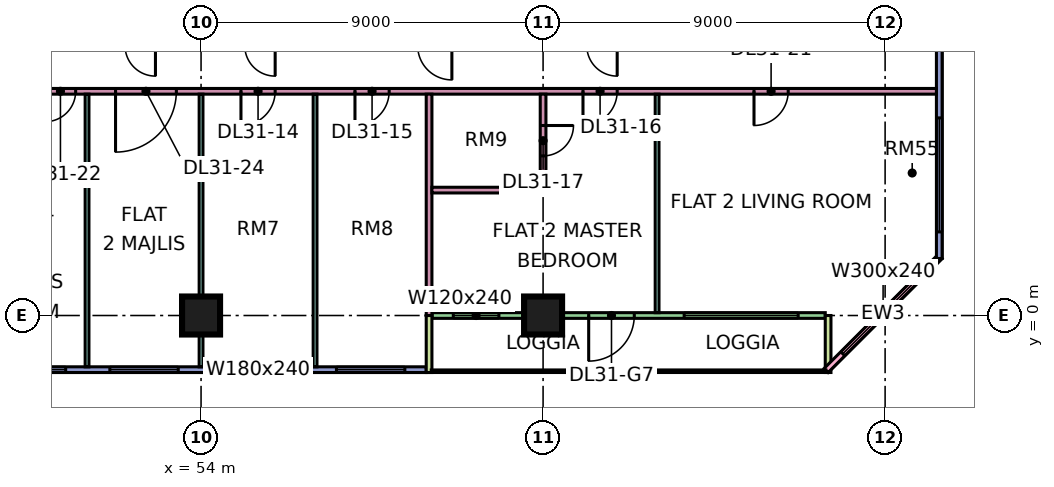
"""IFC4 building model, lengths in metres.
Left out: names, types, materials, properties, quantities, classifications, styles, units other than length and angle.
Written with IfcOpenShell. Run it as: python <this file> out.ifc"""

import sys

from ifc_helpers import new_model, si_unit, direction, frame, frame_2d, origin, origin_2d, place, context, subcontext, project, spatial, rectangle, extrude, element, fill, save


model = new_model("IFC4")
c1 = context("Model", 3, precision=1e-05, world=origin(), true_north=direction((0.0, 1.0)))
c2 = subcontext(c1, "Body", "Model", "MODEL_VIEW")
j1 = project(units=[si_unit("LENGTHUNIT", "METRE"), si_unit("PLANEANGLEUNIT", "RADIAN")], contexts=[c1])
p1 = place(None, origin())
s1 = spatial("IfcSite", under=j1, at=p1, CompositionType="ELEMENT")
p2 = place(p1, origin())
s2 = spatial("IfcBuilding", under=s1, at=p2, CompositionType="ELEMENT")
p3 = place(p2, frame((0.0, 0.0, 133.15)))
s3 = spatial("IfcBuildingStorey", under=s2, at=p3, CompositionType="ELEMENT", Elevation=133.15)
for number, where, z_axis, x_axis in (
    (1, (54.0, 0.0, 0.0), (0.0, 0.0, 1.0), (1.0, 0.0, 0.0)),
    (2, (63.0, 0.0, 0.0), (0.0, 0.0, 1.0), (1.0, 0.0, 0.0)),
):
    element("IfcColumn", number, at=place(p3, frame(where, z_axis=z_axis, x_axis=x_axis)), inside=s3, PredefinedType="COLUMN", context=c2, shape_type="SweptSolid", body=[
        extrude(rectangle(XDim=1.0, YDim=1.0, at=origin_2d()), origin(), (0.0, 0.0, 1.0), 3.75),
    ])
p4 = place(p3, frame((48.075, -1.425, 0.0), z_axis=(0.0, 0.0, 1.0), x_axis=(1.0, 0.0, 0.0)))
e3 = element("IfcWall", 3, at=p4, inside=s3, PredefinedType="SOLIDWALL", context=c2, shape_type="SweptSolid", body=[
    extrude(rectangle(XDim=11.85, YDim=0.15, at=frame_2d((5.925, 0.0))), origin(), (0.0, 0.0, 1.0), 3.35),
])
p5 = place(p4, frame((0.562, 0.0, 0.45)))
e4 = element("IfcOpeningElement", 4, at=p5, cuts=e3, PredefinedType="OPENING", context=c2, shape_type="SweptSolid", body=[
    extrude(rectangle(XDim=1.8, YDim=2.4, at=frame_2d((0.9, 1.2))), frame((0.0, 0.085, 0.0), z_axis=(0.0, -1.0, 0.0), x_axis=(1.0, 0.0, 0.0)), (0.0, 0.0, 1.0), 0.17),
])
p6 = place(p4, frame((3.525, 0.0, 0.45)))
e5 = element("IfcOpeningElement", 5, at=p6, cuts=e3, PredefinedType="OPENING", context=c2, shape_type="SweptSolid", body=[
    extrude(rectangle(XDim=1.8, YDim=2.4, at=frame_2d((0.9, 1.2))), frame((0.0, 0.085, 0.0), z_axis=(0.0, -1.0, 0.0), x_axis=(1.0, 0.0, 0.0)), (0.0, 0.0, 1.0), 0.17),
])
p7 = place(p4, frame((6.525, 0.0, 0.45)))
e6 = element("IfcOpeningElement", 6, at=p7, cuts=e3, PredefinedType="OPENING", context=c2, shape_type="SweptSolid", body=[
    extrude(rectangle(XDim=1.8, YDim=2.4, at=frame_2d((0.9, 1.2))), frame((0.0, 0.085, 0.0), z_axis=(0.0, -1.0, 0.0), x_axis=(1.0, 0.0, 0.0)), (0.0, 0.0, 1.0), 0.17),
])
p8 = place(p4, frame((9.488, 0.0, 0.45)))
e7 = element("IfcOpeningElement", 7, at=p8, cuts=e3, PredefinedType="OPENING", context=c2, shape_type="SweptSolid", body=[
    extrude(rectangle(XDim=1.8, YDim=2.4, at=frame_2d((0.9, 1.2))), frame((0.0, 0.085, 0.0), z_axis=(0.0, -1.0, 0.0), x_axis=(1.0, 0.0, 0.0)), (0.0, 0.0, 1.0), 0.17),
])
p9 = place(p3, frame((60.075, 0.0, 0.0), z_axis=(0.0, 0.0, 1.0), x_axis=(1.0, 0.0, 0.0)))
e8 = element("IfcWall", 8, at=p9, inside=s3, PredefinedType="SOLIDWALL", context=c2, shape_type="SweptSolid", body=[
    extrude(rectangle(XDim=10.35, YDim=0.15, at=frame_2d((5.175, 0.0))), origin(), (0.0, 0.0, 1.0), 3.35),
])
p10 = place(p9, frame((0.562, 0.0, 0.45)))
e9 = element("IfcOpeningElement", 9, at=p10, cuts=e8, PredefinedType="OPENING", context=c2, shape_type="SweptSolid", body=[
    extrude(rectangle(XDim=1.2, YDim=2.4, at=frame_2d((0.6, 1.2))), frame((0.0, 0.085, 0.0), z_axis=(0.0, -1.0, 0.0), x_axis=(1.0, 0.0, 0.0)), (0.0, 0.0, 1.0), 0.17),
])
p11 = place(p9, frame((4.125, 0.0, 0.0)))
e10 = element("IfcOpeningElement", 10, at=p11, cuts=e8, PredefinedType="OPENING", context=c2, shape_type="SweptSolid", body=[
    extrude(rectangle(XDim=1.2, YDim=2.4, at=frame_2d((0.6, 1.2))), frame((0.0, 0.085, 0.0), z_axis=(0.0, -1.0, 0.0), x_axis=(1.0, 0.0, 0.0)), (0.0, 0.0, 1.0), 0.17),
])
p12 = place(p9, frame((6.637, 0.0, 0.45)))
e11 = element("IfcOpeningElement", 11, at=p12, cuts=e8, PredefinedType="OPENING", context=c2, shape_type="SweptSolid", body=[
    extrude(rectangle(XDim=3.0, YDim=2.4, at=frame_2d((1.5, 1.2))), frame((0.0, 0.085, 0.0), z_axis=(0.0, -1.0, 0.0), x_axis=(1.0, 0.0, 0.0)), (0.0, 0.0, 1.0), 0.17),
])
for number, where, z_axis, x_axis in (
    (12, (60.0, -1.5, 0.0), (0.0, 0.0, 1.0), (0.0, 1.0, 0.0)),
    (13, (70.5, -1.5, 0.0), (0.0, 0.0, 1.0), (0.0, 1.0, 0.0)),
):
    element("IfcWall", number, at=place(p3, frame(where, z_axis=z_axis, x_axis=x_axis)), inside=s3, PredefinedType="SOLIDWALL", context=c2, shape_type="SweptSolid", body=[
        extrude(rectangle(XDim=1.5, YDim=0.15, at=frame_2d((0.75, 0.0))), origin(), (0.0, 0.0, 1.0), 3.35),
    ])
p13 = place(p3, frame((70.447, -1.447, 0.0), z_axis=(0.0, 0.0, 1.0), x_axis=(0.707106781187, 0.707106781187, 0.0)))
e14 = element("IfcWall", 14, at=p13, inside=s3, PredefinedType="SOLIDWALL", context=c2, shape_type="SweptSolid", body=[
    extrude(rectangle(XDim=4.243, YDim=0.15, at=frame_2d((2.121, 0.0))), origin(), (0.0, 0.0, 1.0), 3.35),
])
p14 = place(p13, frame((0.621, 0.0, 0.45)))
e15 = element("IfcOpeningElement", 15, at=p14, cuts=e14, PredefinedType="OPENING", context=c2, shape_type="SweptSolid", body=[
    extrude(rectangle(XDim=3.0, YDim=2.4, at=frame_2d((1.5, 1.2))), frame((0.0, 0.085, 0.0), z_axis=(0.0, -1.0, 0.0), x_axis=(1.0, 0.0, 0.0)), (0.0, 0.0, 1.0), 0.17),
])
p15 = place(p3, frame((73.425, 1.5, 0.0), z_axis=(0.0, 0.0, 1.0), x_axis=(0.0, 1.0, 0.0)))
e16 = element("IfcWall", 16, at=p15, inside=s3, PredefinedType="SOLIDWALL", context=c2, shape_type="SweptSolid", body=[
    extrude(rectangle(XDim=10.425, YDim=0.15, at=frame_2d((5.212, 0.0))), origin(), (0.0, 0.0, 1.0), 3.35),
])
p16 = place(p15, frame((0.7, 0.0, 0.45)))
e17 = element("IfcOpeningElement", 17, at=p16, cuts=e16, PredefinedType="OPENING", context=c2, shape_type="SweptSolid", body=[
    extrude(rectangle(XDim=3.0, YDim=2.4, at=frame_2d((1.5, 1.2))), frame((0.0, 0.085, 0.0), z_axis=(0.0, -1.0, 0.0), x_axis=(1.0, 0.0, 0.0)), (0.0, 0.0, 1.0), 0.17),
])
p17 = place(p3, frame((48.1, 5.9, 0.0), z_axis=(0.0, 0.0, 1.0), x_axis=(1.0, 0.0, 0.0)))
e18 = element("IfcWall", 18, at=p17, inside=s3, PredefinedType="PARTITIONING", context=c2, shape_type="SweptSolid", body=[
    extrude(rectangle(XDim=25.25, YDim=0.15, at=frame_2d((12.625, 0.0))), origin(), (0.0, 0.0, 1.0), 3.35),
])
p18 = place(p17, frame((6.95, 0.0, 0.0)))
e19 = element("IfcOpeningElement", 19, at=p18, cuts=e18, PredefinedType="OPENING", context=c2, shape_type="SweptSolid", body=[
    extrude(rectangle(XDim=0.9, YDim=2.1, at=frame_2d((0.45, 1.05))), frame((0.0, 0.085, 0.0), z_axis=(0.0, -1.0, 0.0), x_axis=(1.0, 0.0, 0.0)), (0.0, 0.0, 1.0), 0.17),
])
p19 = place(p17, frame((9.95, 0.0, 0.0)))
e20 = element("IfcOpeningElement", 20, at=p19, cuts=e18, PredefinedType="OPENING", context=c2, shape_type="SweptSolid", body=[
    extrude(rectangle(XDim=0.9, YDim=2.1, at=frame_2d((0.45, 1.05))), frame((0.0, 0.085, 0.0), z_axis=(0.0, -1.0, 0.0), x_axis=(1.0, 0.0, 0.0)), (0.0, 0.0, 1.0), 0.17),
])
p20 = place(p17, frame((15.95, 0.0, 0.0)))
e21 = element("IfcOpeningElement", 21, at=p20, cuts=e18, PredefinedType="OPENING", context=c2, shape_type="SweptSolid", body=[
    extrude(rectangle(XDim=0.9, YDim=2.1, at=frame_2d((0.45, 1.05))), frame((0.0, 0.085, 0.0), z_axis=(0.0, -1.0, 0.0), x_axis=(1.0, 0.0, 0.0)), (0.0, 0.0, 1.0), 0.17),
])
p21 = place(p17, frame((20.45, 0.0, 0.0)))
e22 = element("IfcOpeningElement", 22, at=p21, cuts=e18, PredefinedType="OPENING", context=c2, shape_type="SweptSolid", body=[
    extrude(rectangle(XDim=0.9, YDim=2.1, at=frame_2d((0.45, 1.05))), frame((0.0, 0.085, 0.0), z_axis=(0.0, -1.0, 0.0), x_axis=(1.0, 0.0, 0.0)), (0.0, 0.0, 1.0), 0.17),
])
p22 = place(p17, frame((1.8, 0.0, 0.0)))
e23 = element("IfcOpeningElement", 23, at=p22, cuts=e18, PredefinedType="OPENING", context=c2, shape_type="SweptSolid", body=[
    extrude(rectangle(XDim=0.8, YDim=2.1, at=frame_2d((0.4, 1.05))), frame((0.0, 0.085, 0.0), z_axis=(0.0, -1.0, 0.0), x_axis=(1.0, 0.0, 0.0)), (0.0, 0.0, 1.0), 0.17),
])
p23 = place(p17, frame((3.65, 0.0, 0.0)))
e24 = element("IfcOpeningElement", 24, at=p23, cuts=e18, PredefinedType="OPENING", context=c2, shape_type="SweptSolid", body=[
    extrude(rectangle(XDim=1.6, YDim=2.1, at=frame_2d((0.8, 1.05))), frame((0.0, 0.085, 0.0), z_axis=(0.0, -1.0, 0.0), x_axis=(1.0, 0.0, 0.0)), (0.0, 0.0, 1.0), 0.17),
])
for number, where, z_axis, x_axis in (
    (25, (51.0, -1.351, 0.0), (0.0, 0.0, 1.0), (0.0, 1.0, 0.0)),
    (26, (54.0, -1.351, 0.0), (0.0, 0.0, 1.0), (0.0, 1.0, 0.0)),
    (27, (57.0, -1.351, 0.0), (0.0, 0.0, 1.0), (0.0, 1.0, 0.0)),
):
    element("IfcWall", number, at=place(p3, frame(where, z_axis=z_axis, x_axis=x_axis)), inside=s3, PredefinedType="PARTITIONING", context=c2, shape_type="SweptSolid", body=[
        extrude(rectangle(XDim=7.176, YDim=0.1, at=frame_2d((3.588, 0.0))), origin(), (0.0, 0.0, 1.0), 3.35),
    ])
p24 = place(p3, frame((60.0, 0.0, 0.0), z_axis=(0.0, 0.0, 1.0), x_axis=(0.0, 1.0, 0.0)))
e28 = element("IfcWall", 28, at=p24, inside=s3, PredefinedType="PARTITIONING", context=c2, shape_type="SweptSolid", body=[
    extrude(rectangle(XDim=5.825, YDim=0.15, at=frame_2d((2.913, 0.0))), origin(), (0.0, 0.0, 1.0), 3.35),
])
p25 = place(p3, frame((60.075, 3.3, 0.0), z_axis=(0.0, 0.0, 1.0), x_axis=(1.0, 0.0, 0.0)))
e29 = element("IfcWall", 29, at=p25, inside=s3, PredefinedType="PARTITIONING", context=c2, shape_type="SweptSolid", body=[
    extrude(rectangle(XDim=3.0, YDim=0.15, at=frame_2d((1.5, 0.0))), origin(), (0.0, 0.0, 1.0), 3.35),
])
p26 = place(p3, frame((63.0, 3.375, 0.0), z_axis=(0.0, 0.0, 1.0), x_axis=(0.0, 1.0, 0.0)))
e30 = element("IfcWall", 30, at=p26, inside=s3, PredefinedType="PARTITIONING", context=c2, shape_type="SweptSolid", body=[
    extrude(rectangle(XDim=2.45, YDim=0.15, at=frame_2d((1.225, 0.0))), origin(), (0.0, 0.0, 1.0), 3.35),
])
p27 = place(p26, frame((0.825, 0.0, 0.0)))
e31 = element("IfcOpeningElement", 31, at=p27, cuts=e30, PredefinedType="OPENING", context=c2, shape_type="SweptSolid", body=[
    extrude(rectangle(XDim=0.8, YDim=2.1, at=frame_2d((0.4, 1.05))), frame((0.0, 0.085, 0.0), z_axis=(0.0, -1.0, 0.0), x_axis=(1.0, 0.0, 0.0)), (0.0, 0.0, 1.0), 0.17),
])
p28 = place(p3, frame((66.0, 0.074, 0.0), z_axis=(0.0, 0.0, 1.0), x_axis=(0.0, 1.0, 0.0)))
e32 = element("IfcWall", 32, at=p28, inside=s3, PredefinedType="PARTITIONING", context=c2, shape_type="SweptSolid", body=[
    extrude(rectangle(XDim=5.751, YDim=0.1, at=frame_2d((2.875, 0.0))), origin(), (0.0, 0.0, 1.0), 3.35),
])
p29 = place(p5, origin())
e33 = element("IfcWindow", 33, at=p29, inside=s3, PartitioningType="SINGLE_PANEL", PredefinedType="WINDOW", context=c2, shape_type="SweptSolid", body=[
    extrude(rectangle(XDim=1.8, YDim=2.4, at=frame_2d((0.9, 1.2))), frame((0.0, 0.03, 0.0), z_axis=(0.0, -1.0, 0.0), x_axis=(1.0, 0.0, 0.0)), (0.0, 0.0, 1.0), 0.06),
])
fill(e4, e33)
p30 = place(p6, origin())
e34 = element("IfcWindow", 34, at=p30, inside=s3, PartitioningType="SINGLE_PANEL", PredefinedType="WINDOW", context=c2, shape_type="SweptSolid", body=[
    extrude(rectangle(XDim=1.8, YDim=2.4, at=frame_2d((0.9, 1.2))), frame((0.0, 0.03, 0.0), z_axis=(0.0, -1.0, 0.0), x_axis=(1.0, 0.0, 0.0)), (0.0, 0.0, 1.0), 0.06),
])
fill(e5, e34)
p31 = place(p7, origin())
e35 = element("IfcWindow", 35, at=p31, inside=s3, PartitioningType="SINGLE_PANEL", PredefinedType="WINDOW", context=c2, shape_type="SweptSolid", body=[
    extrude(rectangle(XDim=1.8, YDim=2.4, at=frame_2d((0.9, 1.2))), frame((0.0, 0.03, 0.0), z_axis=(0.0, -1.0, 0.0), x_axis=(1.0, 0.0, 0.0)), (0.0, 0.0, 1.0), 0.06),
])
fill(e6, e35)
p32 = place(p8, origin())
e36 = element("IfcWindow", 36, at=p32, inside=s3, PartitioningType="SINGLE_PANEL", PredefinedType="WINDOW", context=c2, shape_type="SweptSolid", body=[
    extrude(rectangle(XDim=1.8, YDim=2.4, at=frame_2d((0.9, 1.2))), frame((0.0, 0.03, 0.0), z_axis=(0.0, -1.0, 0.0), x_axis=(1.0, 0.0, 0.0)), (0.0, 0.0, 1.0), 0.06),
])
fill(e7, e36)
p33 = place(p10, origin())
e37 = element("IfcWindow", 37, at=p33, inside=s3, PartitioningType="SINGLE_PANEL", PredefinedType="WINDOW", context=c2, shape_type="SweptSolid", body=[
    extrude(rectangle(XDim=1.2, YDim=2.4, at=frame_2d((0.6, 1.2))), frame((0.0, 0.03, 0.0), z_axis=(0.0, -1.0, 0.0), x_axis=(1.0, 0.0, 0.0)), (0.0, 0.0, 1.0), 0.06),
])
fill(e9, e37)
p34 = place(p11, frame((1.2, 0.0, 0.0), z_axis=(0.0, 0.0, 1.0), x_axis=(-1.0, 0.0, 0.0)))
e38 = element("IfcDoor", 38, at=p34, inside=s3, OperationType="DOUBLE_DOOR_SINGLE_SWING", PredefinedType="DOOR", context=c2, shape_type="SweptSolid", body=[
    extrude(rectangle(XDim=1.2, YDim=2.4, at=frame_2d((0.6, 1.2))), frame((0.0, 0.025, 0.0), z_axis=(0.0, -1.0, 0.0), x_axis=(1.0, 0.0, 0.0)), (0.0, 0.0, 1.0), 0.05),
])
fill(e10, e38)
p35 = place(p12, origin())
e39 = element("IfcWindow", 39, at=p35, inside=s3, PartitioningType="SINGLE_PANEL", PredefinedType="WINDOW", context=c2, shape_type="SweptSolid", body=[
    extrude(rectangle(XDim=3.0, YDim=2.4, at=frame_2d((1.5, 1.2))), frame((0.0, 0.03, 0.0), z_axis=(0.0, -1.0, 0.0), x_axis=(1.0, 0.0, 0.0)), (0.0, 0.0, 1.0), 0.06),
])
fill(e11, e39)
p36 = place(p14, origin())
e40 = element("IfcWindow", 40, at=p36, inside=s3, PartitioningType="SINGLE_PANEL", PredefinedType="WINDOW", context=c2, shape_type="SweptSolid", body=[
    extrude(rectangle(XDim=3.0, YDim=2.4, at=frame_2d((1.5, 1.2))), frame((0.0, 0.03, 0.0), z_axis=(0.0, -1.0, 0.0), x_axis=(1.0, 0.0, 0.0)), (0.0, 0.0, 1.0), 0.06),
])
fill(e15, e40)
p37 = place(p16, origin())
e41 = element("IfcWindow", 41, at=p37, inside=s3, PartitioningType="SINGLE_PANEL", PredefinedType="WINDOW", context=c2, shape_type="SweptSolid", body=[
    extrude(rectangle(XDim=3.0, YDim=2.4, at=frame_2d((1.5, 1.2))), frame((0.0, 0.03, 0.0), z_axis=(0.0, -1.0, 0.0), x_axis=(1.0, 0.0, 0.0)), (0.0, 0.0, 1.0), 0.06),
])
fill(e17, e41)
p38 = place(p18, frame((0.9, 0.0, 0.0), z_axis=(0.0, 0.0, 1.0), x_axis=(-1.0, 0.0, 0.0)))
e42 = element("IfcDoor", 42, at=p38, inside=s3, OperationType="SINGLE_SWING_LEFT", PredefinedType="DOOR", context=c2, shape_type="SweptSolid", body=[
    extrude(rectangle(XDim=0.9, YDim=2.1, at=frame_2d((0.45, 1.05))), frame((0.0, 0.025, 0.0), z_axis=(0.0, -1.0, 0.0), x_axis=(1.0, 0.0, 0.0)), (0.0, 0.0, 1.0), 0.05),
])
fill(e19, e42)
p39 = place(p19, frame((0.9, 0.0, 0.0), z_axis=(0.0, 0.0, 1.0), x_axis=(-1.0, 0.0, 0.0)))
e43 = element("IfcDoor", 43, at=p39, inside=s3, OperationType="SINGLE_SWING_LEFT", PredefinedType="DOOR", context=c2, shape_type="SweptSolid", body=[
    extrude(rectangle(XDim=0.9, YDim=2.1, at=frame_2d((0.45, 1.05))), frame((0.0, 0.025, 0.0), z_axis=(0.0, -1.0, 0.0), x_axis=(1.0, 0.0, 0.0)), (0.0, 0.0, 1.0), 0.05),
])
fill(e20, e43)
p40 = place(p20, frame((0.9, 0.0, 0.0), z_axis=(0.0, 0.0, 1.0), x_axis=(-1.0, 0.0, 0.0)))
e44 = element("IfcDoor", 44, at=p40, inside=s3, OperationType="SINGLE_SWING_LEFT", PredefinedType="DOOR", context=c2, shape_type="SweptSolid", body=[
    extrude(rectangle(XDim=0.9, YDim=2.1, at=frame_2d((0.45, 1.05))), frame((0.0, 0.025, 0.0), z_axis=(0.0, -1.0, 0.0), x_axis=(1.0, 0.0, 0.0)), (0.0, 0.0, 1.0), 0.05),
])
fill(e21, e44)
p41 = place(p27, origin())
e45 = element("IfcDoor", 45, at=p41, inside=s3, OperationType="SINGLE_SWING_RIGHT", PredefinedType="DOOR", context=c2, shape_type="SweptSolid", body=[
    extrude(rectangle(XDim=0.8, YDim=2.1, at=frame_2d((0.4, 1.05))), frame((0.0, 0.025, 0.0), z_axis=(0.0, -1.0, 0.0), x_axis=(1.0, 0.0, 0.0)), (0.0, 0.0, 1.0), 0.05),
])
fill(e31, e45)
p42 = place(p21, frame((0.9, 0.0, 0.0), z_axis=(0.0, 0.0, 1.0), x_axis=(-1.0, 0.0, 0.0)))
e46 = element("IfcDoor", 46, at=p42, inside=s3, OperationType="SINGLE_SWING_LEFT", PredefinedType="DOOR", context=c2, shape_type="SweptSolid", body=[
    extrude(rectangle(XDim=0.9, YDim=2.1, at=frame_2d((0.45, 1.05))), frame((0.0, 0.025, 0.0), z_axis=(0.0, -1.0, 0.0), x_axis=(1.0, 0.0, 0.0)), (0.0, 0.0, 1.0), 0.05),
])
fill(e22, e46)
p43 = place(p22, frame((0.8, 0.0, 0.0), z_axis=(0.0, 0.0, 1.0), x_axis=(-1.0, 0.0, 0.0)))
e47 = element("IfcDoor", 47, at=p43, inside=s3, OperationType="SINGLE_SWING_LEFT", PredefinedType="DOOR", context=c2, shape_type="SweptSolid", body=[
    extrude(rectangle(XDim=0.8, YDim=2.1, at=frame_2d((0.4, 1.05))), frame((0.0, 0.025, 0.0), z_axis=(0.0, -1.0, 0.0), x_axis=(1.0, 0.0, 0.0)), (0.0, 0.0, 1.0), 0.05),
])
fill(e23, e47)
p44 = place(p23, frame((1.6, 0.0, 0.0), z_axis=(0.0, 0.0, 1.0), x_axis=(-1.0, 0.0, 0.0)))
e48 = element("IfcDoor", 48, at=p44, inside=s3, OperationType="DOUBLE_DOOR_SINGLE_SWING", PredefinedType="DOOR", context=c2, shape_type="SweptSolid", body=[
    extrude(rectangle(XDim=1.6, YDim=2.1, at=frame_2d((0.8, 1.05))), frame((0.0, 0.025, 0.0), z_axis=(0.0, -1.0, 0.0), x_axis=(1.0, 0.0, 0.0)), (0.0, 0.0, 1.0), 0.05),
])
fill(e24, e48)
save(model, sys.argv[1])
